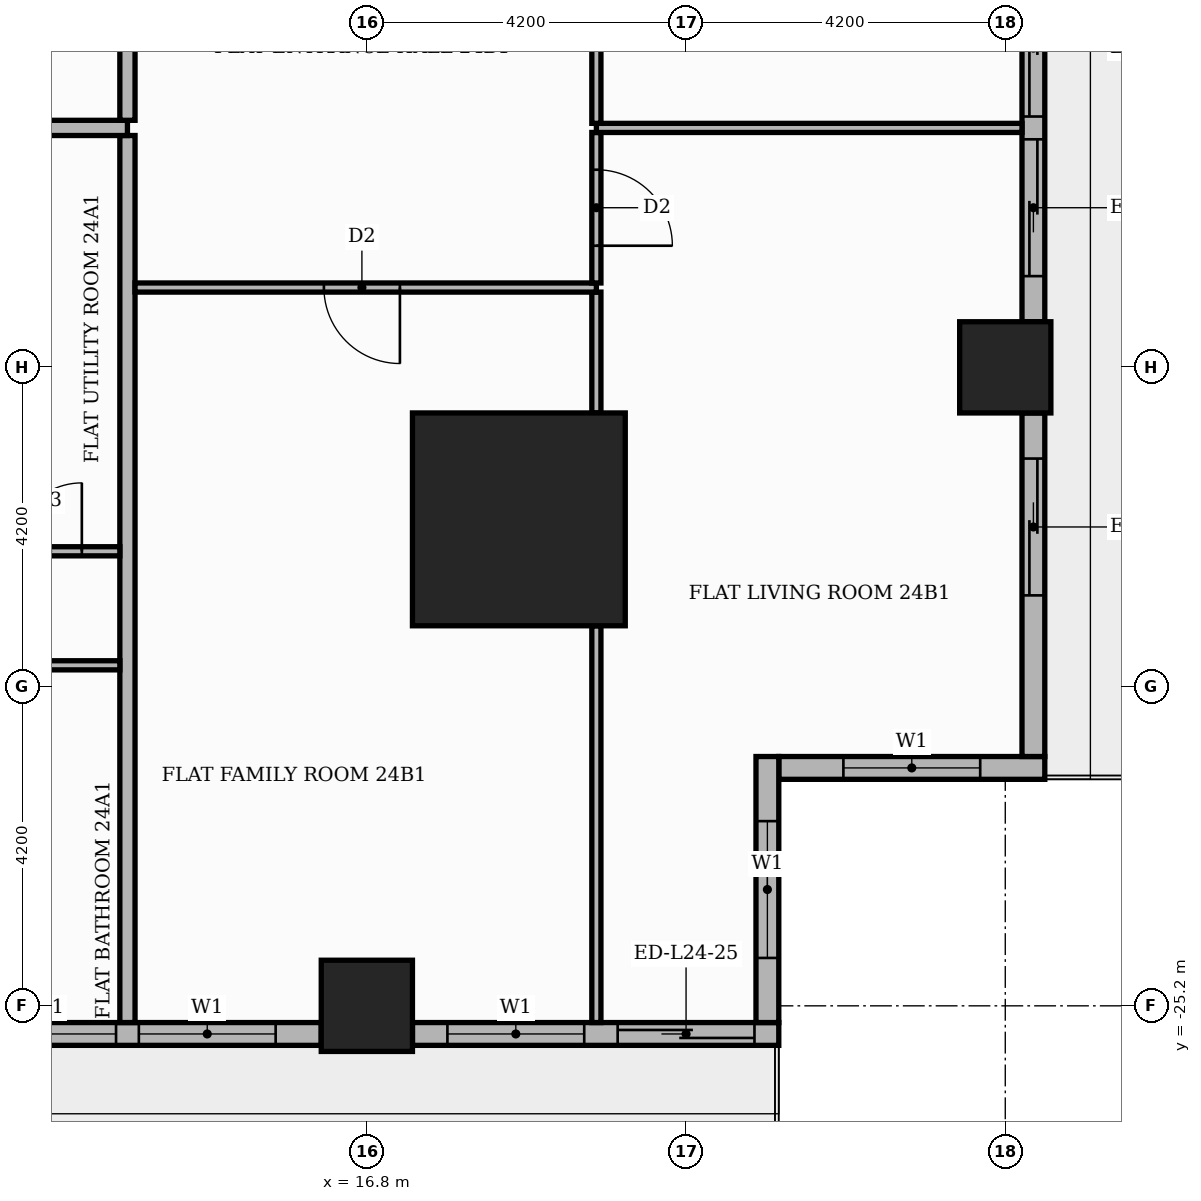
"""IFC4 building model, lengths in metres.
Left out: names, types, materials, properties, quantities, classifications, styles, units other than length and angle.
Written with IfcOpenShell. Run it as: python <this file> out.ifc"""

import sys

from ifc_helpers import new_model, si_unit, direction, frame, frame_2d, origin, origin_2d, place, context, subcontext, project, spatial, rectangle, extrude, element, fill, save


model = new_model("IFC4")
c1 = context("Model", 3, precision=1e-05, world=origin(), true_north=direction((0.0, 1.0)))
c2 = subcontext(c1, "Body", "Model", "MODEL_VIEW")
j1 = project(units=[si_unit("LENGTHUNIT", "METRE"), si_unit("PLANEANGLEUNIT", "RADIAN")], contexts=[c1])
p1 = place(None, origin())
s1 = spatial("IfcSite", under=j1, at=p1, CompositionType="ELEMENT")
p2 = place(p1, origin())
s2 = spatial("IfcBuilding", under=s1, at=p2, CompositionType="ELEMENT")
p3 = place(p2, frame((0.0, 0.0, 102.6)))
s3 = spatial("IfcBuildingStorey", under=s2, at=p3, CompositionType="ELEMENT", Elevation=102.6)
p4 = place(p3, frame((18.8, -18.8, 0.0), z_axis=(0.0, 0.0, 1.0), x_axis=(1.0, 0.0, 0.0)))
e1 = element("IfcColumn", 1, at=p4, inside=s3, PredefinedType="COLUMN", context=c2, shape_type="SweptSolid", body=[
    extrude(rectangle(XDim=2.8, YDim=2.8, at=origin_2d()), origin(), (0.0, 0.0, 1.0), 3.9),
])
for number, where, z_axis, x_axis in (
    (2, (25.2, -16.8, 0.0), (0.0, 0.0, 1.0), (1.0, 0.0, 0.0)),
    (3, (16.8, -25.2, 0.0), (0.0, 0.0, 1.0), (1.0, 0.0, 0.0)),
):
    element("IfcColumn", number, at=place(p3, frame(where, z_axis=z_axis, x_axis=x_axis)), inside=s3, PredefinedType="COLUMN", context=c2, shape_type="SweptSolid", body=[
        extrude(rectangle(XDim=1.2, YDim=1.2, at=origin_2d()), origin(), (0.0, 0.0, 1.0), 3.9),
    ])
p5 = place(p3, frame((22.22, -22.07, 0.0), z_axis=(0.0, 0.0, 1.0), x_axis=(1.0, 0.0, 0.0)))
e4 = element("IfcWall", 4, at=p5, inside=s3, PredefinedType="STANDARD", context=c2, shape_type="SweptSolid", body=[
    extrude(rectangle(XDim=3.5, YDim=0.3, at=frame_2d((1.75, 0.0))), origin(), (0.0, 0.0, 1.0), 3.48),
])
p6 = place(p5, frame((0.85, 0.0, 0.9)))
e5 = element("IfcOpeningElement", 5, at=p6, cuts=e4, PredefinedType="OPENING", context=c2, shape_type="SweptSolid", body=[
    extrude(rectangle(XDim=1.8, YDim=2.1, at=frame_2d((0.9, 1.05))), frame((0.0, 0.16, 0.0), z_axis=(0.0, -1.0, 0.0), x_axis=(1.0, 0.0, 0.0)), (0.0, 0.0, 1.0), 0.32),
])
p7 = place(p3, frame((25.57, -21.92, 0.0), z_axis=(0.0, 0.0, 1.0), x_axis=(0.0, 1.0, 0.0)))
e6 = element("IfcWall", 6, at=p7, inside=s3, PredefinedType="STANDARD", context=c2, shape_type="SweptSolid", body=[
    extrude(rectangle(XDim=4.52, YDim=0.3, at=frame_2d((2.26, 0.0))), origin(), (0.0, 0.0, 1.0), 3.48),
])
p8 = place(p7, frame((2.12, 0.0, 0.0)))
e7 = element("IfcOpeningElement", 7, at=p8, cuts=e6, PredefinedType="OPENING", context=c2, shape_type="SweptSolid", body=[
    extrude(rectangle(XDim=1.8, YDim=2.4, at=frame_2d((0.9, 1.2))), frame((0.0, 0.16, 0.0), z_axis=(0.0, -1.0, 0.0), x_axis=(1.0, 0.0, 0.0)), (0.0, 0.0, 1.0), 0.32),
])
p9 = place(p3, frame((25.57, -16.2, 0.0), z_axis=(0.0, 0.0, 1.0), x_axis=(0.0, 1.0, 0.0)))
e8 = element("IfcWall", 8, at=p9, inside=s3, PredefinedType="STANDARD", context=c2, shape_type="SweptSolid", body=[
    extrude(rectangle(XDim=7.2, YDim=0.3, at=frame_2d((3.6, 0.0))), origin(), (0.0, 0.0, 1.0), 3.48),
])
p10 = place(p9, frame((0.6, 0.0, 0.0)))
e9 = element("IfcOpeningElement", 9, at=p10, cuts=e8, PredefinedType="OPENING", context=c2, shape_type="SweptSolid", body=[
    extrude(rectangle(XDim=1.8, YDim=2.4, at=frame_2d((0.9, 1.2))), frame((0.0, 0.16, 0.0), z_axis=(0.0, -1.0, 0.0), x_axis=(1.0, 0.0, 0.0)), (0.0, 0.0, 1.0), 0.32),
])
p11 = place(p9, frame((2.7, 0.0, 0.0)))
e10 = element("IfcOpeningElement", 10, at=p11, cuts=e8, PredefinedType="OPENING", context=c2, shape_type="SweptSolid", body=[
    extrude(rectangle(XDim=1.8, YDim=2.4, at=frame_2d((0.9, 1.2))), frame((0.0, 0.16, 0.0), z_axis=(0.0, -1.0, 0.0), x_axis=(1.0, 0.0, 0.0)), (0.0, 0.0, 1.0), 0.32),
])
p12 = place(p9, frame((4.8, 0.0, 0.9)))
e11 = element("IfcOpeningElement", 11, at=p12, cuts=e8, PredefinedType="OPENING", context=c2, shape_type="SweptSolid", body=[
    extrude(rectangle(XDim=1.8, YDim=2.1, at=frame_2d((0.9, 1.05))), frame((0.0, 0.16, 0.0), z_axis=(0.0, -1.0, 0.0), x_axis=(1.0, 0.0, 0.0)), (0.0, 0.0, 1.0), 0.32),
])
p13 = place(p3, frame((9.0, -25.57, 0.0), z_axis=(0.0, 0.0, 1.0), x_axis=(1.0, 0.0, 0.0)))
e12 = element("IfcWall", 12, at=p13, inside=s3, PredefinedType="STANDARD", context=c2, shape_type="SweptSolid", body=[
    extrude(rectangle(XDim=7.2, YDim=0.3, at=frame_2d((3.6, 0.0))), origin(), (0.0, 0.0, 1.0), 3.48),
])
p14 = place(p13, frame((0.6, 0.0, 0.9)))
e13 = element("IfcOpeningElement", 13, at=p14, cuts=e12, PredefinedType="OPENING", context=c2, shape_type="SweptSolid", body=[
    extrude(rectangle(XDim=1.8, YDim=2.1, at=frame_2d((0.9, 1.05))), frame((0.0, 0.16, 0.0), z_axis=(0.0, -1.0, 0.0), x_axis=(1.0, 0.0, 0.0)), (0.0, 0.0, 1.0), 0.32),
])
p15 = place(p13, frame((2.7, 0.0, 0.9)))
e14 = element("IfcOpeningElement", 14, at=p15, cuts=e12, PredefinedType="OPENING", context=c2, shape_type="SweptSolid", body=[
    extrude(rectangle(XDim=1.8, YDim=2.1, at=frame_2d((0.9, 1.05))), frame((0.0, 0.16, 0.0), z_axis=(0.0, -1.0, 0.0), x_axis=(1.0, 0.0, 0.0)), (0.0, 0.0, 1.0), 0.32),
])
p16 = place(p13, frame((4.8, 0.0, 0.9)))
e15 = element("IfcOpeningElement", 15, at=p16, cuts=e12, PredefinedType="OPENING", context=c2, shape_type="SweptSolid", body=[
    extrude(rectangle(XDim=1.8, YDim=2.1, at=frame_2d((0.9, 1.05))), frame((0.0, 0.16, 0.0), z_axis=(0.0, -1.0, 0.0), x_axis=(1.0, 0.0, 0.0)), (0.0, 0.0, 1.0), 0.32),
])
p17 = place(p3, frame((17.4, -25.57, 0.0), z_axis=(0.0, 0.0, 1.0), x_axis=(1.0, 0.0, 0.0)))
e16 = element("IfcWall", 16, at=p17, inside=s3, PredefinedType="STANDARD", context=c2, shape_type="SweptSolid", body=[
    extrude(rectangle(XDim=4.82, YDim=0.3, at=frame_2d((2.41, 0.0))), origin(), (0.0, 0.0, 1.0), 3.48),
])
p18 = place(p17, frame((2.7, 0.0, 0.0)))
e17 = element("IfcOpeningElement", 17, at=p18, cuts=e16, PredefinedType="OPENING", context=c2, shape_type="SweptSolid", body=[
    extrude(rectangle(XDim=1.8, YDim=2.4, at=frame_2d((0.9, 1.2))), frame((0.0, 0.16, 0.0), z_axis=(0.0, -1.0, 0.0), x_axis=(1.0, 0.0, 0.0)), (0.0, 0.0, 1.0), 0.32),
])
p19 = place(p17, frame((0.46, 0.0, 0.9)))
e18 = element("IfcOpeningElement", 18, at=p19, cuts=e16, PredefinedType="OPENING", context=c2, shape_type="SweptSolid", body=[
    extrude(rectangle(XDim=1.8, YDim=2.1, at=frame_2d((0.9, 1.05))), frame((0.0, 0.16, 0.0), z_axis=(0.0, -1.0, 0.0), x_axis=(1.0, 0.0, 0.0)), (0.0, 0.0, 1.0), 0.32),
])
p20 = place(p3, frame((22.07, -25.42, 0.0), z_axis=(0.0, 0.0, 1.0), x_axis=(0.0, 1.0, 0.0)))
e19 = element("IfcWall", 19, at=p20, inside=s3, PredefinedType="STANDARD", context=c2, shape_type="SweptSolid", body=[
    extrude(rectangle(XDim=3.5, YDim=0.3, at=frame_2d((1.75, 0.0))), origin(), (0.0, 0.0, 1.0), 3.48),
])
p21 = place(p20, frame((0.85, 0.0, 0.9)))
e20 = element("IfcOpeningElement", 20, at=p21, cuts=e19, PredefinedType="OPENING", context=c2, shape_type="SweptSolid", body=[
    extrude(rectangle(XDim=1.8, YDim=2.1, at=frame_2d((0.9, 1.05))), frame((0.0, 0.16, 0.0), z_axis=(0.0, -1.0, 0.0), x_axis=(1.0, 0.0, 0.0)), (0.0, 0.0, 1.0), 0.32),
])
p22 = place(p3, frame((13.65, -25.42, 0.0), z_axis=(0.0, 0.0, 1.0), x_axis=(0.0, 1.0, 0.0)))
e21 = element("IfcWall", 21, at=p22, inside=s3, PredefinedType="PARTITIONING", context=c2, shape_type="SweptSolid", body=[
    extrude(rectangle(XDim=11.67, YDim=0.2, at=frame_2d((5.835, 0.0))), origin(), (0.0, 0.0, 1.0), 3.48),
])
p23 = place(p3, frame((19.82, -25.42, 0.0), z_axis=(0.0, 0.0, 1.0), x_axis=(0.0, 1.0, 0.0)))
e22 = element("IfcWall", 22, at=p23, inside=s3, PredefinedType="PARTITIONING", context=c2, shape_type="SweptSolid", body=[
    extrude(rectangle(XDim=5.22, YDim=0.12, at=frame_2d((2.61, 0.0))), origin(), (0.0, 0.0, 1.0), 3.48),
])
p24 = place(p3, frame((-25.42, -20.72, 0.0), z_axis=(0.0, 0.0, 1.0), x_axis=(1.0, 0.0, 0.0)))
e23 = element("IfcWall", 23, at=p24, inside=s3, PredefinedType="PARTITIONING", context=c2, shape_type="SweptSolid", body=[
    extrude(rectangle(XDim=38.97, YDim=0.12, at=frame_2d((19.485, 0.0))), origin(), (0.0, 0.0, 1.0), 3.48),
])
p25 = place(p24, frame((12.32, 0.0, 0.0)))
e24 = element("IfcOpeningElement", 24, at=p25, cuts=e23, PredefinedType="OPENING", context=c2, shape_type="SweptSolid", body=[
    extrude(rectangle(XDim=1.0, YDim=2.1, at=frame_2d((0.5, 1.05))), frame((0.0, 0.07, 0.0), z_axis=(0.0, -1.0, 0.0), x_axis=(1.0, 0.0, 0.0)), (0.0, 0.0, 1.0), 0.14),
])
p26 = place(p24, frame((17.57, 0.0, 0.0)))
e25 = element("IfcOpeningElement", 25, at=p26, cuts=e23, PredefinedType="OPENING", context=c2, shape_type="SweptSolid", body=[
    extrude(rectangle(XDim=1.0, YDim=2.1, at=frame_2d((0.5, 1.05))), frame((0.0, 0.07, 0.0), z_axis=(0.0, -1.0, 0.0), x_axis=(1.0, 0.0, 0.0)), (0.0, 0.0, 1.0), 0.14),
])
p27 = place(p24, frame((24.97, 0.0, 0.0)))
e26 = element("IfcOpeningElement", 26, at=p27, cuts=e23, PredefinedType="OPENING", context=c2, shape_type="SweptSolid", body=[
    extrude(rectangle(XDim=0.9, YDim=2.1, at=frame_2d((0.45, 1.05))), frame((0.0, 0.07, 0.0), z_axis=(0.0, -1.0, 0.0), x_axis=(1.0, 0.0, 0.0)), (0.0, 0.0, 1.0), 0.14),
])
p28 = place(p24, frame((34.42, 0.0, 0.0)))
e27 = element("IfcOpeningElement", 27, at=p28, cuts=e23, PredefinedType="OPENING", context=c2, shape_type="SweptSolid", body=[
    extrude(rectangle(XDim=0.9, YDim=2.1, at=frame_2d((0.45, 1.05))), frame((0.0, 0.07, 0.0), z_axis=(0.0, -1.0, 0.0), x_axis=(1.0, 0.0, 0.0)), (0.0, 0.0, 1.0), 0.14),
])
p29 = place(p3, frame((-7.35, -19.22, 0.0), z_axis=(0.0, 0.0, 1.0), x_axis=(1.0, 0.0, 0.0)))
e28 = element("IfcWall", 28, at=p29, inside=s3, PredefinedType="PARTITIONING", context=c2, shape_type="SweptSolid", body=[
    extrude(rectangle(XDim=20.9, YDim=0.12, at=frame_2d((10.45, 0.0))), origin(), (0.0, 0.0, 1.0), 3.48),
])
p30 = place(p29, frame((2.7, 0.0, 0.0)))
e29 = element("IfcOpeningElement", 29, at=p30, cuts=e28, PredefinedType="OPENING", context=c2, shape_type="SweptSolid", body=[
    extrude(rectangle(XDim=0.9, YDim=2.1, at=frame_2d((0.45, 1.05))), frame((0.0, 0.07, 0.0), z_axis=(0.0, -1.0, 0.0), x_axis=(1.0, 0.0, 0.0)), (0.0, 0.0, 1.0), 0.14),
])
p31 = place(p29, frame((7.95, 0.0, 0.0)))
e30 = element("IfcOpeningElement", 30, at=p31, cuts=e28, PredefinedType="OPENING", context=c2, shape_type="SweptSolid", body=[
    extrude(rectangle(XDim=0.9, YDim=2.1, at=frame_2d((0.45, 1.05))), frame((0.0, 0.07, 0.0), z_axis=(0.0, -1.0, 0.0), x_axis=(1.0, 0.0, 0.0)), (0.0, 0.0, 1.0), 0.14),
])
p32 = place(p29, frame((11.1, 0.0, 0.0)))
e31 = element("IfcOpeningElement", 31, at=p32, cuts=e28, PredefinedType="OPENING", context=c2, shape_type="SweptSolid", body=[
    extrude(rectangle(XDim=0.9, YDim=2.1, at=frame_2d((0.45, 1.05))), frame((0.0, 0.07, 0.0), z_axis=(0.0, -1.0, 0.0), x_axis=(1.0, 0.0, 0.0)), (0.0, 0.0, 1.0), 0.14),
])
p33 = place(p29, frame((13.95, 0.0, 0.0)))
e32 = element("IfcOpeningElement", 32, at=p33, cuts=e28, PredefinedType="OPENING", context=c2, shape_type="SweptSolid", body=[
    extrude(rectangle(XDim=0.9, YDim=2.1, at=frame_2d((0.45, 1.05))), frame((0.0, 0.07, 0.0), z_axis=(0.0, -1.0, 0.0), x_axis=(1.0, 0.0, 0.0)), (0.0, 0.0, 1.0), 0.14),
])
p34 = place(p29, frame((17.1, 0.0, 0.0)))
e33 = element("IfcOpeningElement", 33, at=p34, cuts=e28, PredefinedType="OPENING", context=c2, shape_type="SweptSolid", body=[
    extrude(rectangle(XDim=0.9, YDim=2.1, at=frame_2d((0.45, 1.05))), frame((0.0, 0.07, 0.0), z_axis=(0.0, -1.0, 0.0), x_axis=(1.0, 0.0, 0.0)), (0.0, 0.0, 1.0), 0.14),
])
p35 = place(p29, frame((19.5, 0.0, 0.0)))
e34 = element("IfcOpeningElement", 34, at=p35, cuts=e28, PredefinedType="OPENING", context=c2, shape_type="SweptSolid", body=[
    extrude(rectangle(XDim=0.9, YDim=2.1, at=frame_2d((0.45, 1.05))), frame((0.0, 0.07, 0.0), z_axis=(0.0, -1.0, 0.0), x_axis=(1.0, 0.0, 0.0)), (0.0, 0.0, 1.0), 0.14),
])
p36 = place(p3, frame((19.82, -17.4, 0.0), z_axis=(0.0, 0.0, 1.0), x_axis=(0.0, 1.0, 0.0)))
e35 = element("IfcWall", 35, at=p36, inside=s3, PredefinedType="PARTITIONING", context=c2, shape_type="SweptSolid", body=[
    extrude(rectangle(XDim=1.59, YDim=0.12, at=frame_2d((0.795, 0.0))), origin(), (0.0, 0.0, 1.0), 3.48),
])
p37 = place(p3, frame((13.75, -15.75, 0.0), z_axis=(0.0, 0.0, 1.0), x_axis=(1.0, 0.0, 0.0)))
e36 = element("IfcWall", 36, at=p37, inside=s3, PredefinedType="PARTITIONING", context=c2, shape_type="SweptSolid", body=[
    extrude(rectangle(XDim=6.07, YDim=0.12, at=frame_2d((3.035, 0.0))), origin(), (0.0, 0.0, 1.0), 3.48),
])
p38 = place(p37, frame((2.485, 0.0, 0.0)))
e37 = element("IfcOpeningElement", 37, at=p38, cuts=e36, PredefinedType="OPENING", context=c2, shape_type="SweptSolid", body=[
    extrude(rectangle(XDim=1.0, YDim=2.1, at=frame_2d((0.5, 1.05))), frame((0.0, 0.07, 0.0), z_axis=(0.0, -1.0, 0.0), x_axis=(1.0, 0.0, 0.0)), (0.0, 0.0, 1.0), 0.14),
])
p39 = place(p3, frame((19.82, -15.69, 0.0), z_axis=(0.0, 0.0, 1.0), x_axis=(0.0, 1.0, 0.0)))
e38 = element("IfcWall", 38, at=p39, inside=s3, PredefinedType="PARTITIONING", context=c2, shape_type="SweptSolid", body=[
    extrude(rectangle(XDim=1.98, YDim=0.12, at=frame_2d((0.99, 0.0))), origin(), (0.0, 0.0, 1.0), 3.48),
])
p40 = place(p39, frame((0.49, 0.0, 0.0)))
e39 = element("IfcOpeningElement", 39, at=p40, cuts=e38, PredefinedType="OPENING", context=c2, shape_type="SweptSolid", body=[
    extrude(rectangle(XDim=1.0, YDim=2.1, at=frame_2d((0.5, 1.05))), frame((0.0, 0.07, 0.0), z_axis=(0.0, -1.0, 0.0), x_axis=(1.0, 0.0, 0.0)), (0.0, 0.0, 1.0), 0.14),
])
p41 = place(p3, frame((-25.42, -13.65, 0.0), z_axis=(0.0, 0.0, 1.0), x_axis=(1.0, 0.0, 0.0)))
e40 = element("IfcWall", 40, at=p41, inside=s3, PredefinedType="PARTITIONING", context=c2, shape_type="SweptSolid", body=[
    extrude(rectangle(XDim=39.07, YDim=0.2, at=frame_2d((19.535, 0.0))), origin(), (0.0, 0.0, 1.0), 3.48),
])
p42 = place(p41, frame((14.37, 0.0, 0.0)))
e41 = element("IfcOpeningElement", 41, at=p42, cuts=e40, PredefinedType="OPENING", context=c2, shape_type="SweptSolid", body=[
    extrude(rectangle(XDim=1.1, YDim=2.4, at=frame_2d((0.55, 1.2))), frame((0.0, 0.11, 0.0), z_axis=(0.0, -1.0, 0.0), x_axis=(1.0, 0.0, 0.0)), (0.0, 0.0, 1.0), 0.22),
])
p43 = place(p3, frame((19.82, -13.65, 0.0), z_axis=(0.0, 0.0, 1.0), x_axis=(1.0, 0.0, 0.0)))
e42 = element("IfcWall", 42, at=p43, inside=s3, PredefinedType="PARTITIONING", context=c2, shape_type="SweptSolid", body=[
    extrude(rectangle(XDim=5.6, YDim=0.12, at=frame_2d((2.8, 0.0))), origin(), (0.0, 0.0, 1.0), 3.48),
])
p44 = place(p3, frame((19.82, -13.59, 0.0), z_axis=(0.0, 0.0, 1.0), x_axis=(0.0, 1.0, 0.0)))
e43 = element("IfcWall", 43, at=p44, inside=s3, PredefinedType="PARTITIONING", context=c2, shape_type="SweptSolid", body=[
    extrude(rectangle(XDim=4.08, YDim=0.12, at=frame_2d((2.04, 0.0))), origin(), (0.0, 0.0, 1.0), 3.48),
])
p45 = place(p44, frame((1.59, 0.0, 0.0)))
e44 = element("IfcOpeningElement", 44, at=p45, cuts=e43, PredefinedType="OPENING", context=c2, shape_type="SweptSolid", body=[
    extrude(rectangle(XDim=0.9, YDim=2.1, at=frame_2d((0.45, 1.05))), frame((0.0, 0.07, 0.0), z_axis=(0.0, -1.0, 0.0), x_axis=(1.0, 0.0, 0.0)), (0.0, 0.0, 1.0), 0.14),
])
p46 = place(p3, frame((13.65, -13.55, 0.0), z_axis=(0.0, 0.0, 1.0), x_axis=(0.0, 1.0, 0.0)))
e45 = element("IfcWall", 45, at=p46, inside=s3, PredefinedType="PARTITIONING", context=c2, shape_type="SweptSolid", body=[
    extrude(rectangle(XDim=8.2, YDim=0.2, at=frame_2d((4.1, 0.0))), origin(), (0.0, 0.0, 1.0), 3.48),
])
p47 = place(p46, frame((1.45, 0.0, 0.0)))
e46 = element("IfcOpeningElement", 46, at=p47, cuts=e45, PredefinedType="OPENING", context=c2, shape_type="SweptSolid", body=[
    extrude(rectangle(XDim=1.1, YDim=2.4, at=frame_2d((0.55, 1.2))), frame((0.0, 0.11, 0.0), z_axis=(0.0, -1.0, 0.0), x_axis=(1.0, 0.0, 0.0)), (0.0, 0.0, 1.0), 0.22),
])
p48 = place(p6, origin())
e47 = element("IfcWindow", 47, at=p48, inside=s3, PartitioningType="SINGLE_PANEL", PredefinedType="WINDOW", context=c2, shape_type="SweptSolid", body=[
    extrude(rectangle(XDim=1.8, YDim=2.1, at=frame_2d((0.9, 1.05))), frame((0.0, 0.03, 0.0), z_axis=(0.0, -1.0, 0.0), x_axis=(1.0, 0.0, 0.0)), (0.0, 0.0, 1.0), 0.06),
])
fill(e5, e47)
p49 = place(p8, origin())
e48 = element("IfcDoor", 48, at=p49, inside=s3, OperationType="SLIDING_TO_RIGHT", PredefinedType="DOOR", context=c2, shape_type="SweptSolid", body=[
    extrude(rectangle(XDim=1.8, YDim=2.4, at=frame_2d((0.9, 1.2))), frame((0.0, 0.025, 0.0), z_axis=(0.0, -1.0, 0.0), x_axis=(1.0, 0.0, 0.0)), (0.0, 0.0, 1.0), 0.05),
])
fill(e7, e48)
p50 = place(p10, origin())
e49 = element("IfcDoor", 49, at=p50, inside=s3, OperationType="SLIDING_TO_LEFT", PredefinedType="DOOR", context=c2, shape_type="SweptSolid", body=[
    extrude(rectangle(XDim=1.8, YDim=2.4, at=frame_2d((0.9, 1.2))), frame((0.0, 0.025, 0.0), z_axis=(0.0, -1.0, 0.0), x_axis=(1.0, 0.0, 0.0)), (0.0, 0.0, 1.0), 0.05),
])
fill(e9, e49)
p51 = place(p11, origin())
e50 = element("IfcDoor", 50, at=p51, inside=s3, OperationType="SLIDING_TO_RIGHT", PredefinedType="DOOR", context=c2, shape_type="SweptSolid", body=[
    extrude(rectangle(XDim=1.8, YDim=2.4, at=frame_2d((0.9, 1.2))), frame((0.0, 0.025, 0.0), z_axis=(0.0, -1.0, 0.0), x_axis=(1.0, 0.0, 0.0)), (0.0, 0.0, 1.0), 0.05),
])
fill(e10, e50)
p52 = place(p15, origin())
e51 = element("IfcWindow", 51, at=p52, inside=s3, PartitioningType="SINGLE_PANEL", PredefinedType="WINDOW", context=c2, shape_type="SweptSolid", body=[
    extrude(rectangle(XDim=1.8, YDim=2.1, at=frame_2d((0.9, 1.05))), frame((0.0, 0.03, 0.0), z_axis=(0.0, -1.0, 0.0), x_axis=(1.0, 0.0, 0.0)), (0.0, 0.0, 1.0), 0.06),
])
fill(e14, e51)
p53 = place(p16, origin())
e52 = element("IfcWindow", 52, at=p53, inside=s3, PartitioningType="SINGLE_PANEL", PredefinedType="WINDOW", context=c2, shape_type="SweptSolid", body=[
    extrude(rectangle(XDim=1.8, YDim=2.1, at=frame_2d((0.9, 1.05))), frame((0.0, 0.03, 0.0), z_axis=(0.0, -1.0, 0.0), x_axis=(1.0, 0.0, 0.0)), (0.0, 0.0, 1.0), 0.06),
])
fill(e15, e52)
p54 = place(p18, origin())
e53 = element("IfcDoor", 53, at=p54, inside=s3, OperationType="SLIDING_TO_LEFT", PredefinedType="DOOR", context=c2, shape_type="SweptSolid", body=[
    extrude(rectangle(XDim=1.8, YDim=2.4, at=frame_2d((0.9, 1.2))), frame((0.0, 0.025, 0.0), z_axis=(0.0, -1.0, 0.0), x_axis=(1.0, 0.0, 0.0)), (0.0, 0.0, 1.0), 0.05),
])
fill(e17, e53)
p55 = place(p19, origin())
e54 = element("IfcWindow", 54, at=p55, inside=s3, PartitioningType="SINGLE_PANEL", PredefinedType="WINDOW", context=c2, shape_type="SweptSolid", body=[
    extrude(rectangle(XDim=1.8, YDim=2.1, at=frame_2d((0.9, 1.05))), frame((0.0, 0.03, 0.0), z_axis=(0.0, -1.0, 0.0), x_axis=(1.0, 0.0, 0.0)), (0.0, 0.0, 1.0), 0.06),
])
fill(e18, e54)
p56 = place(p21, origin())
e55 = element("IfcWindow", 55, at=p56, inside=s3, PartitioningType="SINGLE_PANEL", PredefinedType="WINDOW", context=c2, shape_type="SweptSolid", body=[
    extrude(rectangle(XDim=1.8, YDim=2.1, at=frame_2d((0.9, 1.05))), frame((0.0, 0.03, 0.0), z_axis=(0.0, -1.0, 0.0), x_axis=(1.0, 0.0, 0.0)), (0.0, 0.0, 1.0), 0.06),
])
fill(e20, e55)
p57 = place(p35, origin())
e56 = element("IfcDoor", 56, at=p57, inside=s3, OperationType="SINGLE_SWING_RIGHT", PredefinedType="DOOR", context=c2, shape_type="SweptSolid", body=[
    extrude(rectangle(XDim=0.9, YDim=2.1, at=frame_2d((0.45, 1.05))), frame((0.0, 0.025, 0.0), z_axis=(0.0, -1.0, 0.0), x_axis=(1.0, 0.0, 0.0)), (0.0, 0.0, 1.0), 0.05),
])
fill(e34, e56)
p58 = place(p38, frame((1.0, 0.0, 0.0), z_axis=(0.0, 0.0, 1.0), x_axis=(-1.0, 0.0, 0.0)))
e57 = element("IfcDoor", 57, at=p58, inside=s3, OperationType="SINGLE_SWING_RIGHT", PredefinedType="DOOR", context=c2, shape_type="SweptSolid", body=[
    extrude(rectangle(XDim=1.0, YDim=2.1, at=frame_2d((0.5, 1.05))), frame((0.0, 0.025, 0.0), z_axis=(0.0, -1.0, 0.0), x_axis=(1.0, 0.0, 0.0)), (0.0, 0.0, 1.0), 0.05),
])
fill(e37, e57)
p59 = place(p40, frame((1.0, 0.0, 0.0), z_axis=(0.0, 0.0, 1.0), x_axis=(-1.0, 0.0, 0.0)))
e58 = element("IfcDoor", 58, at=p59, inside=s3, OperationType="SINGLE_SWING_LEFT", PredefinedType="DOOR", context=c2, shape_type="SweptSolid", body=[
    extrude(rectangle(XDim=1.0, YDim=2.1, at=frame_2d((0.5, 1.05))), frame((0.0, 0.025, 0.0), z_axis=(0.0, -1.0, 0.0), x_axis=(1.0, 0.0, 0.0)), (0.0, 0.0, 1.0), 0.05),
])
fill(e39, e58)
save(model, sys.argv[1])
